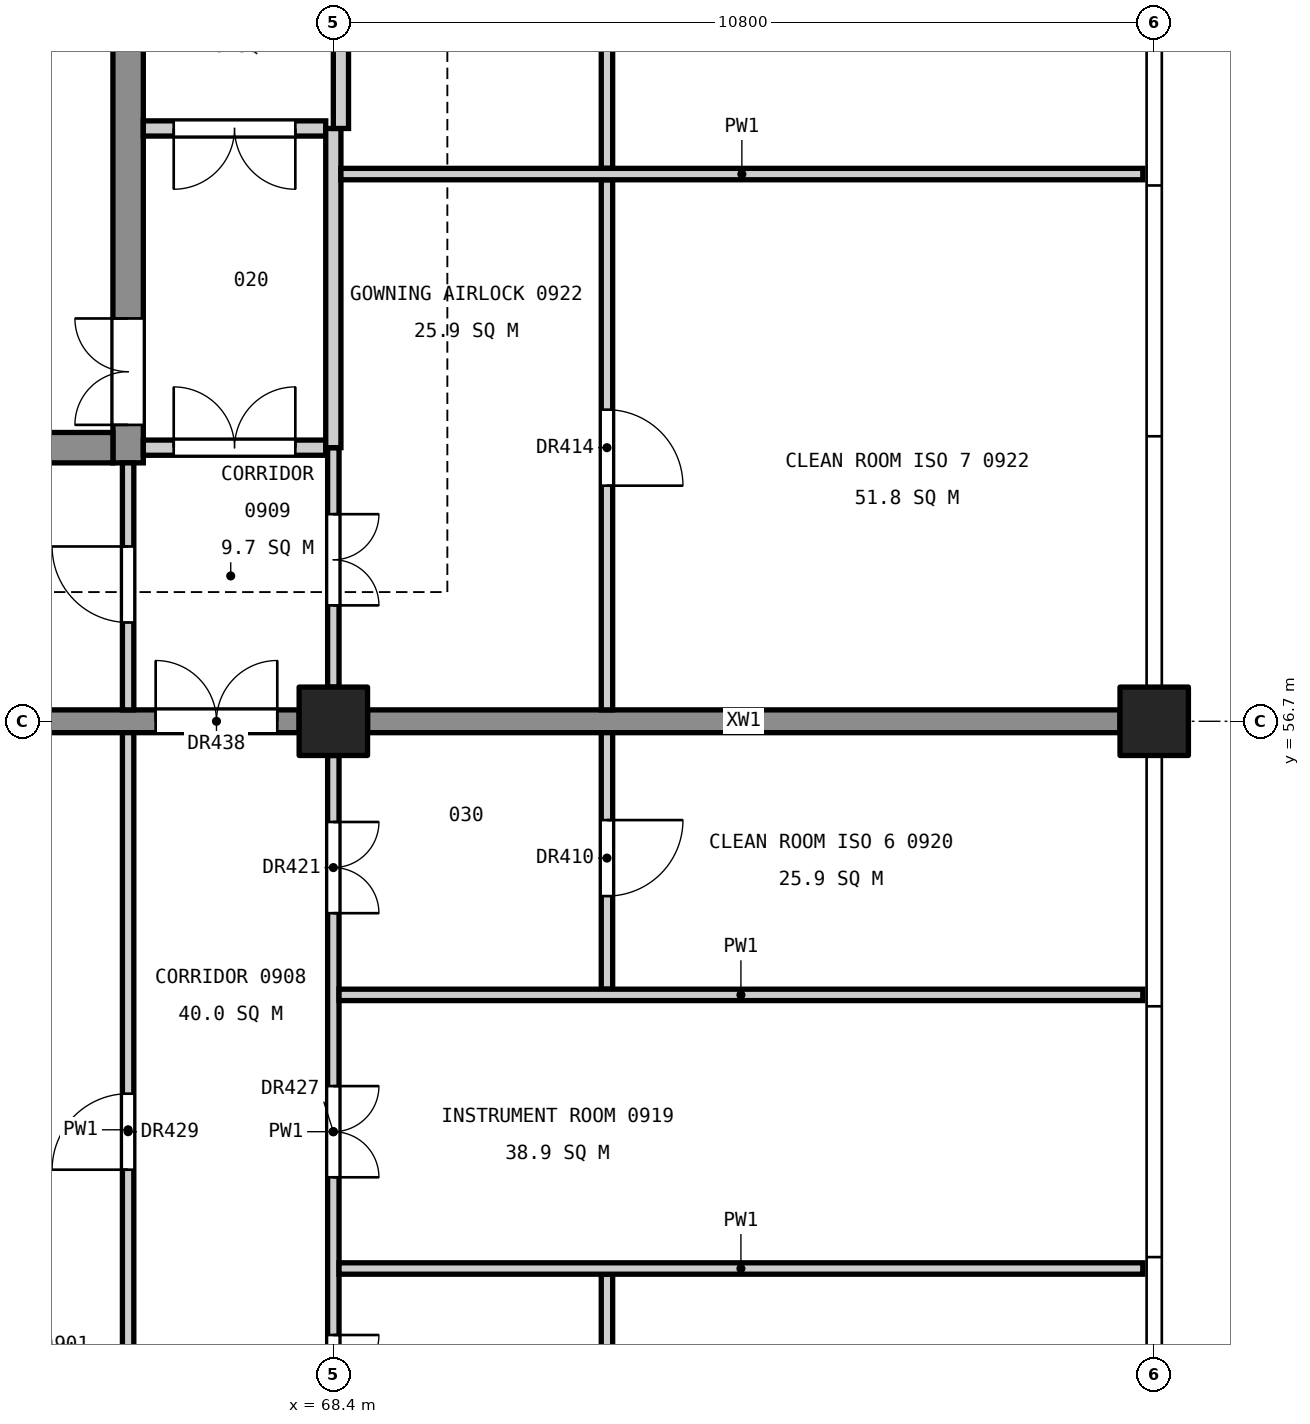
"""IFC4 building model, lengths in metres.
Left out: names, types, materials, properties, quantities, classifications, styles, units other than length and angle.
Written with IfcOpenShell. Run it as: python <this file> out.ifc"""

import sys

from ifc_helpers import new_model, si_unit, direction, frame, frame_2d, origin, origin_2d, place, context, subcontext, project, spatial, rectangle, extrude, element, fill, save


model = new_model("IFC4")
c1 = context("Model", 3, precision=1e-05, world=origin(), true_north=direction((0.0, 1.0)))
c2 = subcontext(c1, "Body", "Model", "MODEL_VIEW")
j1 = project(units=[si_unit("LENGTHUNIT", "METRE"), si_unit("PLANEANGLEUNIT", "RADIAN")], contexts=[c1])
p1 = place(None, origin())
s1 = spatial("IfcSite", under=j1, at=p1, CompositionType="ELEMENT")
p2 = place(p1, origin())
s2 = spatial("IfcBuilding", under=s1, at=p2, CompositionType="ELEMENT")
p3 = place(p2, frame((0.0, 0.0, 46.2)))
s3 = spatial("IfcBuildingStorey", under=s2, at=p3, CompositionType="ELEMENT", Elevation=46.2)
for number, where, z_axis, x_axis in (
    (1, (68.4, 56.7, 0.0), (0.0, 0.0, 1.0), (1.0, 0.0, 0.0)),
    (2, (79.2, 56.7, 0.0), (0.0, 0.0, 1.0), (1.0, 0.0, 0.0)),
):
    element("IfcColumn", number, at=place(p3, frame(where, z_axis=z_axis, x_axis=x_axis)), inside=s3, PredefinedType="COLUMN", context=c2, shape_type="SweptSolid", body=[
        extrude(rectangle(XDim=0.9, YDim=0.9, at=origin_2d()), origin(), (0.0, 0.0, 1.0), 4.8),
    ])
p4 = place(p3, frame((65.7, 60.1, 0.0), z_axis=(0.0, 0.0, 1.0), x_axis=(0.0, 1.0, 0.0)))
e3 = element("IfcWall", 3, at=p4, inside=s3, PredefinedType="SHEAR", context=c2, shape_type="SweptSolid", body=[
    extrude(rectangle(XDim=14.8, YDim=0.4, at=frame_2d((7.4, 0.0))), origin(), (0.0, 0.0, 1.0), 4.55),
])
p5 = place(p4, frame((0.5, 0.0, 0.0)))
e4 = element("IfcOpeningElement", 4, at=p5, cuts=e3, PredefinedType="OPENING", context=c2, shape_type="SweptSolid", body=[
    extrude(rectangle(XDim=1.4, YDim=2.1, at=frame_2d((0.7, 1.05))), frame((0.0, 0.21, 0.0), z_axis=(0.0, -1.0, 0.0), x_axis=(1.0, 0.0, 0.0)), (0.0, 0.0, 1.0), 0.42),
])
p6 = place(p4, frame((8.8, 0.0, 0.0)))
e5 = element("IfcOpeningElement", 5, at=p6, cuts=e3, PredefinedType="OPENING", context=c2, shape_type="SweptSolid", body=[
    extrude(rectangle(XDim=1.1, YDim=2.1, at=frame_2d((0.55, 1.05))), frame((0.0, 0.21, 0.0), z_axis=(0.0, -1.0, 0.0), x_axis=(1.0, 0.0, 0.0)), (0.0, 0.0, 1.0), 0.42),
])
p7 = place(p4, frame((11.35, 0.0, 0.0)))
e6 = element("IfcOpeningElement", 6, at=p7, cuts=e3, PredefinedType="OPENING", context=c2, shape_type="SweptSolid", body=[
    extrude(rectangle(XDim=1.1, YDim=2.1, at=frame_2d((0.55, 1.05))), frame((0.0, 0.21, 0.0), z_axis=(0.0, -1.0, 0.0), x_axis=(1.0, 0.0, 0.0)), (0.0, 0.0, 1.0), 0.42),
])
p8 = place(p3, frame((61.4, 60.3, 0.0), z_axis=(0.0, 0.0, 1.0), x_axis=(1.0, 0.0, 0.0)))
e7 = element("IfcWall", 7, at=p8, inside=s3, PredefinedType="SHEAR", context=c2, shape_type="SweptSolid", body=[
    extrude(rectangle(XDim=4.1, YDim=0.4, at=frame_2d((2.05, 0.0))), origin(), (0.0, 0.0, 1.0), 4.55),
])
p9 = place(p3, frame((61.65, 56.7, 0.0), z_axis=(0.0, 0.0, 1.0), x_axis=(1.0, 0.0, 0.0)))
e8 = element("IfcWall", 8, at=p9, inside=s3, PredefinedType="SHEAR", context=c2, shape_type="SweptSolid", body=[
    extrude(rectangle(XDim=6.3, YDim=0.3, at=frame_2d((3.15, 0.0))), origin(), (0.0, 0.0, 1.0), 4.55),
])
p10 = place(p9, frame((4.413, 0.0, 0.0)))
e9 = element("IfcOpeningElement", 9, at=p10, cuts=e8, PredefinedType="OPENING", context=c2, shape_type="SweptSolid", body=[
    extrude(rectangle(XDim=1.6, YDim=2.1, at=frame_2d((0.8, 1.05))), frame((0.0, 0.16, 0.0), z_axis=(0.0, -1.0, 0.0), x_axis=(1.0, 0.0, 0.0)), (0.0, 0.0, 1.0), 0.32),
])
p11 = place(p3, frame((68.85, 56.7, 0.0), z_axis=(0.0, 0.0, 1.0), x_axis=(1.0, 0.0, 0.0)))
e10 = element("IfcWall", 10, at=p11, inside=s3, PredefinedType="SHEAR", context=c2, shape_type="SweptSolid", body=[
    extrude(rectangle(XDim=9.9, YDim=0.3, at=frame_2d((4.95, 0.0))), origin(), (0.0, 0.0, 1.0), 4.55),
])
p12 = place(p3, frame((65.7, 46.1, 0.0), z_axis=(0.0, 0.0, 1.0), x_axis=(0.0, 1.0, 0.0)))
e11 = element("IfcWall", 11, at=p12, inside=s3, PredefinedType="PARTITIONING", context=c2, shape_type="SweptSolid", body=[
    extrude(rectangle(XDim=10.45, YDim=0.15, at=frame_2d((5.225, 0.0))), origin(), (0.0, 0.0, 1.0), 3.55),
])
p13 = place(p12, frame((4.7, 0.0, 0.0)))
e12 = element("IfcOpeningElement", 12, at=p13, cuts=e11, PredefinedType="OPENING", context=c2, shape_type="SweptSolid", body=[
    extrude(rectangle(XDim=1.0, YDim=2.1, at=frame_2d((0.5, 1.05))), frame((0.0, 0.085, 0.0), z_axis=(0.0, -1.0, 0.0), x_axis=(1.0, 0.0, 0.0)), (0.0, 0.0, 1.0), 0.17),
])
p14 = place(p3, frame((65.7, 56.85, 0.0), z_axis=(0.0, 0.0, 1.0), x_axis=(0.0, 1.0, 0.0)))
e13 = element("IfcWall", 13, at=p14, inside=s3, PredefinedType="PARTITIONING", context=c2, shape_type="SweptSolid", body=[
    extrude(rectangle(XDim=3.25, YDim=0.15, at=frame_2d((1.625, 0.0))), origin(), (0.0, 0.0, 1.0), 3.55),
])
p15 = place(p14, frame((1.15, 0.0, 0.0)))
e14 = element("IfcOpeningElement", 14, at=p15, cuts=e13, PredefinedType="OPENING", context=c2, shape_type="SweptSolid", body=[
    extrude(rectangle(XDim=1.0, YDim=2.1, at=frame_2d((0.5, 1.05))), frame((0.0, 0.085, 0.0), z_axis=(0.0, -1.0, 0.0), x_axis=(1.0, 0.0, 0.0)), (0.0, 0.0, 1.0), 0.17),
])
p16 = place(p3, frame((65.9, 60.3, 0.0), z_axis=(0.0, 0.0, 1.0), x_axis=(1.0, 0.0, 0.0)))
e15 = element("IfcWall", 15, at=p16, inside=s3, PredefinedType="PARTITIONING", context=c2, shape_type="SweptSolid", body=[
    extrude(rectangle(XDim=2.4, YDim=0.2, at=frame_2d((1.2, 0.0))), origin(), (0.0, 0.0, 1.0), 3.85),
])
p17 = place(p16, frame((0.4, 0.0, 0.0)))
e16 = element("IfcOpeningElement", 16, at=p17, cuts=e15, PredefinedType="OPENING", context=c2, shape_type="SweptSolid", body=[
    extrude(rectangle(XDim=1.6, YDim=2.1, at=frame_2d((0.8, 1.05))), frame((0.0, 0.11, 0.0), z_axis=(0.0, -1.0, 0.0), x_axis=(1.0, 0.0, 0.0)), (0.0, 0.0, 1.0), 0.22),
])
p18 = place(p3, frame((65.9, 64.5, 0.0), z_axis=(0.0, 0.0, 1.0), x_axis=(1.0, 0.0, 0.0)))
e17 = element("IfcWall", 17, at=p18, inside=s3, PredefinedType="PARTITIONING", context=c2, shape_type="SweptSolid", body=[
    extrude(rectangle(XDim=2.4, YDim=0.2, at=frame_2d((1.2, 0.0))), origin(), (0.0, 0.0, 1.0), 3.55),
])
p19 = place(p18, frame((0.4, 0.0, 0.0)))
e18 = element("IfcOpeningElement", 18, at=p19, cuts=e17, PredefinedType="OPENING", context=c2, shape_type="SweptSolid", body=[
    extrude(rectangle(XDim=1.6, YDim=2.1, at=frame_2d((0.8, 1.05))), frame((0.0, 0.11, 0.0), z_axis=(0.0, -1.0, 0.0), x_axis=(1.0, 0.0, 0.0)), (0.0, 0.0, 1.0), 0.22),
])
p20 = place(p3, frame((68.4, 46.35, 0.0), z_axis=(0.0, 0.0, 1.0), x_axis=(0.0, 1.0, 0.0)))
e19 = element("IfcWall", 19, at=p20, inside=s3, PredefinedType="PARTITIONING", context=c2, shape_type="SweptSolid", body=[
    extrude(rectangle(XDim=9.9, YDim=0.15, at=frame_2d((4.95, 0.0))), origin(), (0.0, 0.0, 1.0), 3.55),
])
p21 = place(p20, frame((1.075, 0.0, 0.0)))
e20 = element("IfcOpeningElement", 20, at=p21, cuts=e19, PredefinedType="OPENING", context=c2, shape_type="SweptSolid", body=[
    extrude(rectangle(XDim=1.2, YDim=2.1, at=frame_2d((0.6, 1.05))), frame((0.0, 0.085, 0.0), z_axis=(0.0, -1.0, 0.0), x_axis=(1.0, 0.0, 0.0)), (0.0, 0.0, 1.0), 0.17),
])
p22 = place(p20, frame((7.825, 0.0, 0.0)))
e21 = element("IfcOpeningElement", 21, at=p22, cuts=e19, PredefinedType="OPENING", context=c2, shape_type="SweptSolid", body=[
    extrude(rectangle(XDim=1.2, YDim=2.1, at=frame_2d((0.6, 1.05))), frame((0.0, 0.085, 0.0), z_axis=(0.0, -1.0, 0.0), x_axis=(1.0, 0.0, 0.0)), (0.0, 0.0, 1.0), 0.17),
])
p23 = place(p20, frame((4.35, 0.0, 0.0)))
e22 = element("IfcOpeningElement", 22, at=p23, cuts=e19, PredefinedType="OPENING", context=c2, shape_type="SweptSolid", body=[
    extrude(rectangle(XDim=1.2, YDim=2.1, at=frame_2d((0.6, 1.05))), frame((0.0, 0.085, 0.0), z_axis=(0.0, -1.0, 0.0), x_axis=(1.0, 0.0, 0.0)), (0.0, 0.0, 1.0), 0.17),
])
p24 = place(p3, frame((68.4, 57.15, 0.0), z_axis=(0.0, 0.0, 1.0), x_axis=(0.0, 1.0, 0.0)))
e23 = element("IfcWall", 23, at=p24, inside=s3, PredefinedType="PARTITIONING", context=c2, shape_type="SweptSolid", body=[
    extrude(rectangle(XDim=3.15, YDim=0.15, at=frame_2d((1.575, 0.0))), origin(), (0.0, 0.0, 1.0), 3.55),
])
p25 = place(p24, frame((1.075, 0.0, 0.0)))
e24 = element("IfcOpeningElement", 24, at=p25, cuts=e23, PredefinedType="OPENING", context=c2, shape_type="SweptSolid", body=[
    extrude(rectangle(XDim=1.2, YDim=2.1, at=frame_2d((0.6, 1.05))), frame((0.0, 0.085, 0.0), z_axis=(0.0, -1.0, 0.0), x_axis=(1.0, 0.0, 0.0)), (0.0, 0.0, 1.0), 0.17),
])
p26 = place(p3, frame((68.4, 60.3, 0.0), z_axis=(0.0, 0.0, 1.0), x_axis=(0.0, 1.0, 0.0)))
e25 = element("IfcWall", 25, at=p26, inside=s3, PredefinedType="PARTITIONING", context=c2, shape_type="SweptSolid", body=[
    extrude(rectangle(XDim=4.2, YDim=0.2, at=frame_2d((2.1, 0.0))), origin(), (0.0, 0.0, 1.0), 3.55),
])
p27 = place(p3, frame((68.5, 64.5, 0.0), z_axis=(0.0, 0.0, 1.0), x_axis=(0.0, 1.0, 0.0)))
e26 = element("IfcWall", 26, at=p27, inside=s3, PredefinedType="PARTITIONING", context=c2, shape_type="SweptSolid", body=[
    extrude(rectangle(XDim=2.55, YDim=0.2, at=frame_2d((1.275, 0.0))), origin(), (0.0, 0.0, 1.0), 3.55),
])
p28 = place(p3, frame((72.0, 45.975, 0.0), z_axis=(0.0, 0.0, 1.0), x_axis=(0.0, 1.0, 0.0)))
e27 = element("IfcWall", 27, at=p28, inside=s3, PredefinedType="PARTITIONING", context=c2, shape_type="SweptSolid", body=[
    extrude(rectangle(XDim=3.45, YDim=0.15, at=frame_2d((1.725, 0.0))), origin(), (0.0, 0.0, 1.0), 3.55),
])
p29 = place(p28, frame((1.225, 0.0, 0.0)))
e28 = element("IfcOpeningElement", 28, at=p29, cuts=e27, PredefinedType="OPENING", context=c2, shape_type="SweptSolid", body=[
    extrude(rectangle(XDim=1.0, YDim=2.1, at=frame_2d((0.5, 1.05))), frame((0.0, 0.085, 0.0), z_axis=(0.0, -1.0, 0.0), x_axis=(1.0, 0.0, 0.0)), (0.0, 0.0, 1.0), 0.17),
])
p30 = place(p3, frame((72.0, 53.175, 0.0), z_axis=(0.0, 0.0, 1.0), x_axis=(0.0, 1.0, 0.0)))
e29 = element("IfcWall", 29, at=p30, inside=s3, PredefinedType="PARTITIONING", context=c2, shape_type="SweptSolid", body=[
    extrude(rectangle(XDim=3.375, YDim=0.15, at=frame_2d((1.688, 0.0))), origin(), (0.0, 0.0, 1.0), 3.55),
])
p31 = place(p30, frame((1.225, 0.0, 0.0)))
e30 = element("IfcOpeningElement", 30, at=p31, cuts=e29, PredefinedType="OPENING", context=c2, shape_type="SweptSolid", body=[
    extrude(rectangle(XDim=1.0, YDim=2.1, at=frame_2d((0.5, 1.05))), frame((0.0, 0.085, 0.0), z_axis=(0.0, -1.0, 0.0), x_axis=(1.0, 0.0, 0.0)), (0.0, 0.0, 1.0), 0.17),
])
p32 = place(p3, frame((72.0, 56.85, 0.0), z_axis=(0.0, 0.0, 1.0), x_axis=(0.0, 1.0, 0.0)))
e31 = element("IfcWall", 31, at=p32, inside=s3, PredefinedType="PARTITIONING", context=c2, shape_type="SweptSolid", body=[
    extrude(rectangle(XDim=6.975, YDim=0.15, at=frame_2d((3.487, 0.0))), origin(), (0.0, 0.0, 1.0), 3.55),
])
p33 = place(p32, frame((2.95, 0.0, 0.0)))
e32 = element("IfcOpeningElement", 32, at=p33, cuts=e31, PredefinedType="OPENING", context=c2, shape_type="SweptSolid", body=[
    extrude(rectangle(XDim=1.0, YDim=2.1, at=frame_2d((0.5, 1.05))), frame((0.0, 0.085, 0.0), z_axis=(0.0, -1.0, 0.0), x_axis=(1.0, 0.0, 0.0)), (0.0, 0.0, 1.0), 0.17),
])
p34 = place(p3, frame((72.0, 63.975, 0.0), z_axis=(0.0, 0.0, 1.0), x_axis=(0.0, 1.0, 0.0)))
e33 = element("IfcWall", 33, at=p34, inside=s3, PredefinedType="PARTITIONING", context=c2, shape_type="SweptSolid", body=[
    extrude(rectangle(XDim=14.175, YDim=0.15, at=frame_2d((7.087, 0.0))), origin(), (0.0, 0.0, 1.0), 3.55),
])
p35 = place(p34, frame((6.625, 0.0, 0.0)))
e34 = element("IfcOpeningElement", 34, at=p35, cuts=e33, PredefinedType="OPENING", context=c2, shape_type="SweptSolid", body=[
    extrude(rectangle(XDim=1.0, YDim=2.1, at=frame_2d((0.5, 1.05))), frame((0.0, 0.085, 0.0), z_axis=(0.0, -1.0, 0.0), x_axis=(1.0, 0.0, 0.0)), (0.0, 0.0, 1.0), 0.17),
])
for number, where, z_axis, x_axis in (
    (35, (68.475, 49.5, 0.0), (0.0, 0.0, 1.0), (1.0, 0.0, 0.0)),
    (36, (68.475, 53.1, 0.0), (0.0, 0.0, 1.0), (1.0, 0.0, 0.0)),
):
    element("IfcWall", number, at=place(p3, frame(where, z_axis=z_axis, x_axis=x_axis)), inside=s3, PredefinedType="PARTITIONING", context=c2, shape_type="SweptSolid", body=[
        extrude(rectangle(XDim=10.575, YDim=0.15, at=frame_2d((5.288, 0.0))), origin(), (0.0, 0.0, 1.0), 3.85),
    ])
p36 = place(p3, frame((68.5, 63.9, 0.0), z_axis=(0.0, 0.0, 1.0), x_axis=(1.0, 0.0, 0.0)))
e37 = element("IfcWall", 37, at=p36, inside=s3, PredefinedType="PARTITIONING", context=c2, shape_type="SweptSolid", body=[
    extrude(rectangle(XDim=10.55, YDim=0.15, at=frame_2d((5.275, 0.0))), origin(), (0.0, 0.0, 1.0), 3.85),
])
p37 = place(p5, origin())
e38 = element("IfcDoor", 38, at=p37, inside=s3, OperationType="DOUBLE_DOOR_SINGLE_SWING", PredefinedType="DOOR", context=c2, shape_type="SweptSolid", body=[
    extrude(rectangle(XDim=1.4, YDim=2.1, at=frame_2d((0.7, 1.05))), frame((0.0, 0.025, 0.0), z_axis=(0.0, -1.0, 0.0), x_axis=(1.0, 0.0, 0.0)), (0.0, 0.0, 1.0), 0.05),
])
fill(e4, e38)
p38 = place(p31, frame((1.0, 0.0, 0.0), z_axis=(0.0, 0.0, 1.0), x_axis=(-1.0, 0.0, 0.0)))
e39 = element("IfcDoor", 39, at=p38, inside=s3, OperationType="SINGLE_SWING_LEFT", PredefinedType="DOOR", context=c2, shape_type="SweptSolid", body=[
    extrude(rectangle(XDim=1.0, YDim=2.1, at=frame_2d((0.5, 1.05))), frame((0.0, 0.025, 0.0), z_axis=(0.0, -1.0, 0.0), x_axis=(1.0, 0.0, 0.0)), (0.0, 0.0, 1.0), 0.05),
])
fill(e30, e39)
p39 = place(p33, frame((1.0, 0.0, 0.0), z_axis=(0.0, 0.0, 1.0), x_axis=(-1.0, 0.0, 0.0)))
e40 = element("IfcDoor", 40, at=p39, inside=s3, OperationType="SINGLE_SWING_RIGHT", PredefinedType="DOOR", context=c2, shape_type="SweptSolid", body=[
    extrude(rectangle(XDim=1.0, YDim=2.1, at=frame_2d((0.5, 1.05))), frame((0.0, 0.025, 0.0), z_axis=(0.0, -1.0, 0.0), x_axis=(1.0, 0.0, 0.0)), (0.0, 0.0, 1.0), 0.05),
])
fill(e32, e40)
p40 = place(p21, frame((1.2, 0.0, 0.0), z_axis=(0.0, 0.0, 1.0), x_axis=(-1.0, 0.0, 0.0)))
e41 = element("IfcDoor", 41, at=p40, inside=s3, OperationType="DOUBLE_DOOR_SINGLE_SWING", PredefinedType="DOOR", context=c2, shape_type="SweptSolid", body=[
    extrude(rectangle(XDim=1.2, YDim=2.1, at=frame_2d((0.6, 1.05))), frame((0.0, 0.025, 0.0), z_axis=(0.0, -1.0, 0.0), x_axis=(1.0, 0.0, 0.0)), (0.0, 0.0, 1.0), 0.05),
])
fill(e20, e41)
p41 = place(p22, frame((1.2, 0.0, 0.0), z_axis=(0.0, 0.0, 1.0), x_axis=(-1.0, 0.0, 0.0)))
e42 = element("IfcDoor", 42, at=p41, inside=s3, OperationType="DOUBLE_DOOR_SINGLE_SWING", PredefinedType="DOOR", context=c2, shape_type="SweptSolid", body=[
    extrude(rectangle(XDim=1.2, YDim=2.1, at=frame_2d((0.6, 1.05))), frame((0.0, 0.025, 0.0), z_axis=(0.0, -1.0, 0.0), x_axis=(1.0, 0.0, 0.0)), (0.0, 0.0, 1.0), 0.05),
])
fill(e21, e42)
p42 = place(p25, frame((1.2, 0.0, 0.0), z_axis=(0.0, 0.0, 1.0), x_axis=(-1.0, 0.0, 0.0)))
e43 = element("IfcDoor", 43, at=p42, inside=s3, OperationType="DOUBLE_DOOR_SINGLE_SWING", PredefinedType="DOOR", context=c2, shape_type="SweptSolid", body=[
    extrude(rectangle(XDim=1.2, YDim=2.1, at=frame_2d((0.6, 1.05))), frame((0.0, 0.025, 0.0), z_axis=(0.0, -1.0, 0.0), x_axis=(1.0, 0.0, 0.0)), (0.0, 0.0, 1.0), 0.05),
])
fill(e24, e43)
p43 = place(p23, frame((1.2, 0.0, 0.0), z_axis=(0.0, 0.0, 1.0), x_axis=(-1.0, 0.0, 0.0)))
e44 = element("IfcDoor", 44, at=p43, inside=s3, OperationType="DOUBLE_DOOR_SINGLE_SWING", PredefinedType="DOOR", context=c2, shape_type="SweptSolid", body=[
    extrude(rectangle(XDim=1.2, YDim=2.1, at=frame_2d((0.6, 1.05))), frame((0.0, 0.025, 0.0), z_axis=(0.0, -1.0, 0.0), x_axis=(1.0, 0.0, 0.0)), (0.0, 0.0, 1.0), 0.05),
])
fill(e22, e44)
p44 = place(p13, origin())
e45 = element("IfcDoor", 45, at=p44, inside=s3, OperationType="SINGLE_SWING_LEFT", PredefinedType="DOOR", context=c2, shape_type="SweptSolid", body=[
    extrude(rectangle(XDim=1.0, YDim=2.1, at=frame_2d((0.5, 1.05))), frame((0.0, 0.025, 0.0), z_axis=(0.0, -1.0, 0.0), x_axis=(1.0, 0.0, 0.0)), (0.0, 0.0, 1.0), 0.05),
])
fill(e12, e45)
p45 = place(p15, origin())
e46 = element("IfcDoor", 46, at=p45, inside=s3, OperationType="SINGLE_SWING_RIGHT", PredefinedType="DOOR", context=c2, shape_type="SweptSolid", body=[
    extrude(rectangle(XDim=1.0, YDim=2.1, at=frame_2d((0.5, 1.05))), frame((0.0, 0.025, 0.0), z_axis=(0.0, -1.0, 0.0), x_axis=(1.0, 0.0, 0.0)), (0.0, 0.0, 1.0), 0.05),
])
fill(e14, e46)
p46 = place(p17, origin())
e47 = element("IfcDoor", 47, at=p46, inside=s3, OperationType="DOUBLE_DOOR_SINGLE_SWING", PredefinedType="DOOR", context=c2, shape_type="SweptSolid", body=[
    extrude(rectangle(XDim=1.6, YDim=2.1, at=frame_2d((0.8, 1.05))), frame((0.0, 0.025, 0.0), z_axis=(0.0, -1.0, 0.0), x_axis=(1.0, 0.0, 0.0)), (0.0, 0.0, 1.0), 0.05),
])
fill(e16, e47)
p47 = place(p19, frame((1.6, 0.0, 0.0), z_axis=(0.0, 0.0, 1.0), x_axis=(-1.0, 0.0, 0.0)))
e48 = element("IfcDoor", 48, at=p47, inside=s3, OperationType="DOUBLE_DOOR_SINGLE_SWING", PredefinedType="DOOR", context=c2, shape_type="SweptSolid", body=[
    extrude(rectangle(XDim=1.6, YDim=2.1, at=frame_2d((0.8, 1.05))), frame((0.0, 0.025, 0.0), z_axis=(0.0, -1.0, 0.0), x_axis=(1.0, 0.0, 0.0)), (0.0, 0.0, 1.0), 0.05),
])
fill(e18, e48)
p48 = place(p10, origin())
e49 = element("IfcDoor", 49, at=p48, inside=s3, OperationType="DOUBLE_DOOR_SINGLE_SWING", PredefinedType="DOOR", context=c2, shape_type="SweptSolid", body=[
    extrude(rectangle(XDim=1.6, YDim=2.1, at=frame_2d((0.8, 1.05))), frame((0.0, 0.025, 0.0), z_axis=(0.0, -1.0, 0.0), x_axis=(1.0, 0.0, 0.0)), (0.0, 0.0, 1.0), 0.05),
])
fill(e9, e49)
save(model, sys.argv[1])
